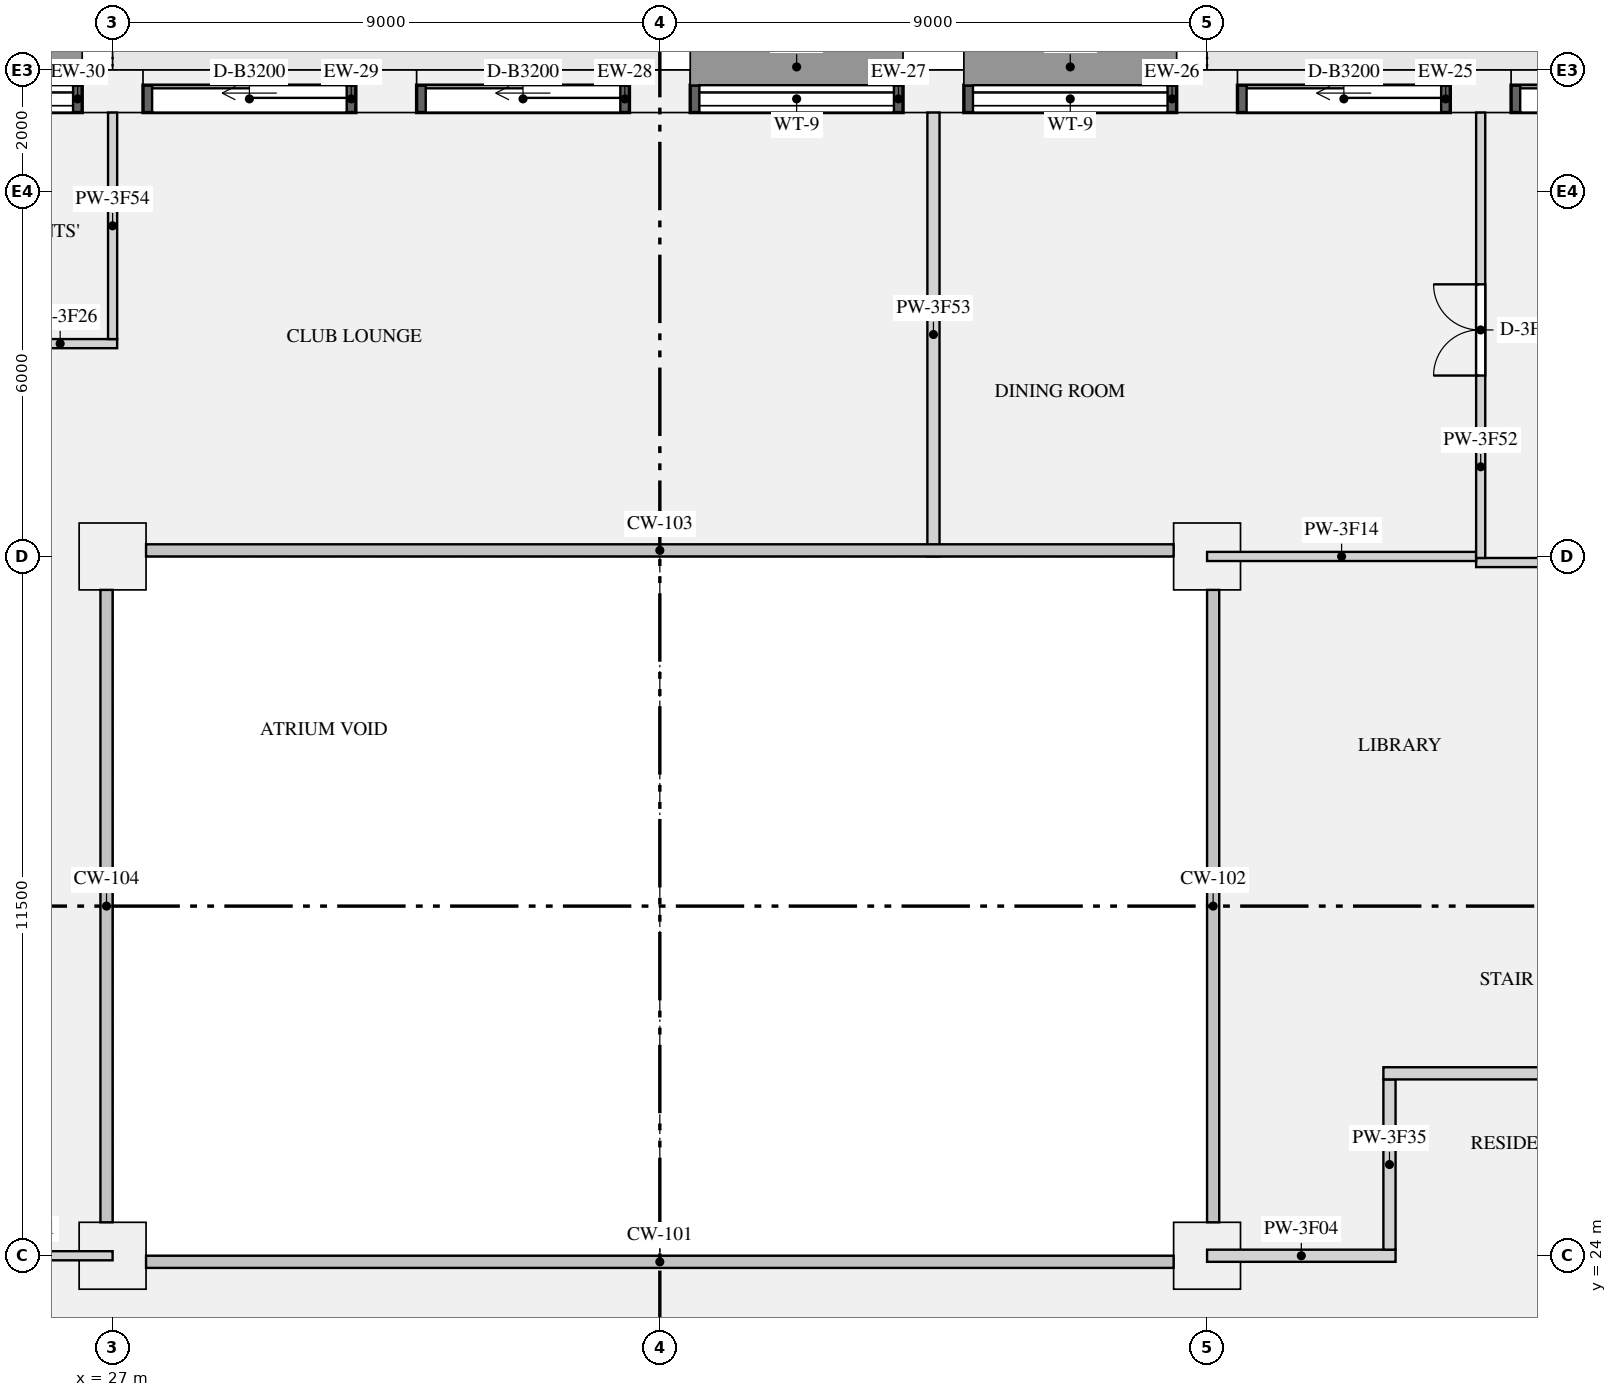
"""IFC4 building model, lengths in metres.
Left out: names, types, materials, properties, quantities, classifications, styles, units other than length and angle.
Written with IfcOpenShell. Run it as: python <this file> out.ifc"""

import sys

from ifc_helpers import new_model, si_unit, direction, frame, frame_2d, origin, origin_2d, place, context, subcontext, project, spatial, rectangle, extrude, element, fill, save


model = new_model("IFC4")
c1 = context("Model", 3, precision=1e-05, world=origin(), true_north=direction((0.0, 1.0)))
c2 = subcontext(c1, "Body", "Model", "MODEL_VIEW")
j1 = project(units=[si_unit("LENGTHUNIT", "METRE"), si_unit("PLANEANGLEUNIT", "RADIAN")], contexts=[c1])
p1 = place(None, origin())
s1 = spatial("IfcSite", under=j1, at=p1, CompositionType="ELEMENT")
p2 = place(p1, origin())
s2 = spatial("IfcBuilding", under=s1, at=p2, CompositionType="ELEMENT")
p3 = place(p2, frame((0.0, 0.0, 182.25)))
s3 = spatial("IfcBuildingStorey", under=s2, at=p3, CompositionType="ELEMENT", Elevation=182.25)
for number, where, z_axis, x_axis in (
    (1, (49.5, 43.15, 0.0), (0.0, 0.0, 1.0), (-1.0, 0.0, 0.0)),
    (2, (45.0, 43.15, 0.0), (0.0, 0.0, 1.0), (-1.0, 0.0, 0.0)),
    (3, (40.5, 43.15, 0.0), (0.0, 0.0, 1.0), (-1.0, 0.0, 0.0)),
    (4, (36.0, 43.15, 0.0), (0.0, 0.0, 1.0), (-1.0, 0.0, 0.0)),
    (5, (31.5, 43.15, 0.0), (0.0, 0.0, 1.0), (-1.0, 0.0, 0.0)),
    (6, (27.0, 43.15, 0.0), (0.0, 0.0, 1.0), (-1.0, 0.0, 0.0)),
):
    element("IfcColumn", number, at=place(p3, frame(where, z_axis=z_axis, x_axis=x_axis)), inside=s3, PredefinedType="USERDEFINED", context=c2, shape_type="SweptSolid", body=[
        extrude(rectangle(XDim=1.0, YDim=0.7, at=origin_2d()), origin(), (0.0, 0.0, 1.0), 2.65),
    ])
for number, where, z_axis, x_axis in (
    (7, (27.0, 24.0, 0.0), (0.0, 0.0, 1.0), (1.0, 0.0, 0.0)),
    (8, (45.0, 24.0, 0.0), (0.0, 0.0, 1.0), (1.0, 0.0, 0.0)),
    (9, (27.0, 35.5, 0.0), (0.0, 0.0, 1.0), (1.0, 0.0, 0.0)),
    (10, (45.0, 35.5, 0.0), (0.0, 0.0, 1.0), (1.0, 0.0, 0.0)),
):
    element("IfcColumn", number, at=place(p3, frame(where, z_axis=z_axis, x_axis=x_axis)), inside=s3, PredefinedType="COLUMN", context=c2, shape_type="SweptSolid", body=[
        extrude(rectangle(XDim=1.1, YDim=1.1, at=origin_2d()), origin(), (0.0, 0.0, 1.0), 3.15),
    ])
p4 = place(p3, frame((53.5, 43.025, 0.0), z_axis=(0.0, 0.0, 1.0), x_axis=(-1.0, 0.0, 0.0)))
e11 = element("IfcWall", 11, at=p4, inside=s3, PredefinedType="SOLIDWALL", context=c2, shape_type="SweptSolid", body=[
    extrude(rectangle(XDim=3.5, YDim=0.45, at=frame_2d((1.75, 0.0))), origin(), (0.0, 0.0, 1.0), 2.65),
])
p5 = place(p4, frame((0.15, 0.0, 0.0)))
e12 = element("IfcOpeningElement", 12, at=p5, cuts=e11, PredefinedType="OPENING", context=c2, shape_type="SweptSolid", body=[
    extrude(rectangle(XDim=3.2, YDim=2.3, at=frame_2d((1.6, 1.15))), frame((0.0, 0.235, 0.0), z_axis=(0.0, -1.0, 0.0), x_axis=(1.0, 0.0, 0.0)), (0.0, 0.0, 1.0), 0.47),
])
p6 = place(p3, frame((49.0, 43.025, 0.0), z_axis=(0.0, 0.0, 1.0), x_axis=(-1.0, 0.0, 0.0)))
e13 = element("IfcWall", 13, at=p6, inside=s3, PredefinedType="SOLIDWALL", context=c2, shape_type="SweptSolid", body=[
    extrude(rectangle(XDim=3.5, YDim=0.45, at=frame_2d((1.75, 0.0))), origin(), (0.0, 0.0, 1.0), 2.65),
])
p7 = place(p6, frame((0.15, 0.0, 0.0)))
e14 = element("IfcOpeningElement", 14, at=p7, cuts=e13, PredefinedType="OPENING", context=c2, shape_type="SweptSolid", body=[
    extrude(rectangle(XDim=3.2, YDim=2.3, at=frame_2d((1.6, 1.15))), frame((0.0, 0.235, 0.0), z_axis=(0.0, -1.0, 0.0), x_axis=(1.0, 0.0, 0.0)), (0.0, 0.0, 1.0), 0.47),
])
p8 = place(p3, frame((44.5, 43.025, 0.9), z_axis=(0.0, 0.0, 1.0), x_axis=(-1.0, 0.0, 0.0)))
e15 = element("IfcWall", 15, at=p8, inside=s3, PredefinedType="SOLIDWALL", context=c2, shape_type="SweptSolid", body=[
    extrude(rectangle(XDim=3.5, YDim=0.45, at=frame_2d((1.75, 0.0))), origin(), (0.0, 0.0, 1.0), 1.75),
])
p9 = place(p8, frame((0.15, 0.0, 0.15)))
e16 = element("IfcOpeningElement", 16, at=p9, cuts=e15, PredefinedType="OPENING", context=c2, shape_type="SweptSolid", body=[
    extrude(rectangle(XDim=3.2, YDim=1.5, at=frame_2d((1.6, 0.75))), frame((0.0, 0.235, 0.0), z_axis=(0.0, -1.0, 0.0), x_axis=(1.0, 0.0, 0.0)), (0.0, 0.0, 1.0), 0.47),
])
p10 = place(p3, frame((40.0, 43.025, 0.9), z_axis=(0.0, 0.0, 1.0), x_axis=(-1.0, 0.0, 0.0)))
e17 = element("IfcWall", 17, at=p10, inside=s3, PredefinedType="SOLIDWALL", context=c2, shape_type="SweptSolid", body=[
    extrude(rectangle(XDim=3.5, YDim=0.45, at=frame_2d((1.75, 0.0))), origin(), (0.0, 0.0, 1.0), 1.75),
])
p11 = place(p10, frame((0.15, 0.0, 0.15)))
e18 = element("IfcOpeningElement", 18, at=p11, cuts=e17, PredefinedType="OPENING", context=c2, shape_type="SweptSolid", body=[
    extrude(rectangle(XDim=3.2, YDim=1.5, at=frame_2d((1.6, 0.75))), frame((0.0, 0.235, 0.0), z_axis=(0.0, -1.0, 0.0), x_axis=(1.0, 0.0, 0.0)), (0.0, 0.0, 1.0), 0.47),
])
p12 = place(p3, frame((35.5, 43.025, 0.0), z_axis=(0.0, 0.0, 1.0), x_axis=(-1.0, 0.0, 0.0)))
e19 = element("IfcWall", 19, at=p12, inside=s3, PredefinedType="SOLIDWALL", context=c2, shape_type="SweptSolid", body=[
    extrude(rectangle(XDim=3.5, YDim=0.45, at=frame_2d((1.75, 0.0))), origin(), (0.0, 0.0, 1.0), 2.65),
])
p13 = place(p12, frame((0.15, 0.0, 0.0)))
e20 = element("IfcOpeningElement", 20, at=p13, cuts=e19, PredefinedType="OPENING", context=c2, shape_type="SweptSolid", body=[
    extrude(rectangle(XDim=3.2, YDim=2.3, at=frame_2d((1.6, 1.15))), frame((0.0, 0.235, 0.0), z_axis=(0.0, -1.0, 0.0), x_axis=(1.0, 0.0, 0.0)), (0.0, 0.0, 1.0), 0.47),
])
p14 = place(p3, frame((31.0, 43.025, 0.0), z_axis=(0.0, 0.0, 1.0), x_axis=(-1.0, 0.0, 0.0)))
e21 = element("IfcWall", 21, at=p14, inside=s3, PredefinedType="SOLIDWALL", context=c2, shape_type="SweptSolid", body=[
    extrude(rectangle(XDim=3.5, YDim=0.45, at=frame_2d((1.75, 0.0))), origin(), (0.0, 0.0, 1.0), 2.65),
])
p15 = place(p14, frame((0.15, 0.0, 0.0)))
e22 = element("IfcOpeningElement", 22, at=p15, cuts=e21, PredefinedType="OPENING", context=c2, shape_type="SweptSolid", body=[
    extrude(rectangle(XDim=3.2, YDim=2.3, at=frame_2d((1.6, 1.15))), frame((0.0, 0.235, 0.0), z_axis=(0.0, -1.0, 0.0), x_axis=(1.0, 0.0, 0.0)), (0.0, 0.0, 1.0), 0.47),
])
p16 = place(p3, frame((26.5, 43.025, 0.9), z_axis=(0.0, 0.0, 1.0), x_axis=(-1.0, 0.0, 0.0)))
e23 = element("IfcWall", 23, at=p16, inside=s3, PredefinedType="SOLIDWALL", context=c2, shape_type="SweptSolid", body=[
    extrude(rectangle(XDim=3.5, YDim=0.45, at=frame_2d((1.75, 0.0))), origin(), (0.0, 0.0, 1.0), 1.75),
])
p17 = place(p16, frame((0.15, 0.0, 0.15)))
e24 = element("IfcOpeningElement", 24, at=p17, cuts=e23, PredefinedType="OPENING", context=c2, shape_type="SweptSolid", body=[
    extrude(rectangle(XDim=3.2, YDim=1.5, at=frame_2d((1.6, 0.75))), frame((0.0, 0.235, 0.0), z_axis=(0.0, -1.0, 0.0), x_axis=(1.0, 0.0, 0.0)), (0.0, 0.0, 1.0), 0.47),
])
p18 = place(p3, frame((23.925, 24.0, 0.0), z_axis=(0.0, 0.0, 1.0), x_axis=(1.0, 0.0, 0.0)))
e25 = element("IfcWall", 25, at=p18, inside=s3, PredefinedType="PARTITIONING", context=c2, shape_type="SweptSolid", body=[
    extrude(rectangle(XDim=3.075, YDim=0.15, at=frame_2d((1.538, 0.0))), origin(), (0.0, 0.0, 1.0), 2.65),
])
p19 = place(p3, frame((45.0, 24.0, 0.0), z_axis=(0.0, 0.0, 1.0), x_axis=(1.0, 0.0, 0.0)))
e26 = element("IfcWall", 26, at=p19, inside=s3, PredefinedType="PARTITIONING", context=c2, shape_type="SweptSolid", body=[
    extrude(rectangle(XDim=3.1, YDim=0.2, at=frame_2d((1.55, 0.0))), origin(), (0.0, 0.0, 1.0), 2.65),
])
p20 = place(p3, frame((47.9, 27.0, 0.0), z_axis=(0.0, 0.0, 1.0), x_axis=(1.0, 0.0, 0.0)))
e27 = element("IfcWall", 27, at=p20, inside=s3, PredefinedType="PARTITIONING", context=c2, shape_type="SweptSolid", body=[
    extrude(rectangle(XDim=7.0, YDim=0.2, at=frame_2d((3.5, 0.0))), origin(), (0.0, 0.0, 1.0), 2.65),
])
p21 = place(p3, frame((49.425, 35.4, 0.0), z_axis=(0.0, 0.0, 1.0), x_axis=(1.0, 0.0, 0.0)))
e28 = element("IfcWall", 28, at=p21, inside=s3, PredefinedType="PARTITIONING", context=c2, shape_type="SweptSolid", body=[
    extrude(rectangle(XDim=6.775, YDim=0.15, at=frame_2d((3.387, 0.0))), origin(), (0.0, 0.0, 1.0), 2.65),
])
p22 = place(p21, frame((1.6, 0.0, 0.0)))
e29 = element("IfcOpeningElement", 29, at=p22, cuts=e28, PredefinedType="OPENING", context=c2, shape_type="SweptSolid", body=[
    extrude(rectangle(XDim=0.9, YDim=2.1, at=frame_2d((0.45, 1.05))), frame((0.0, 0.085, 0.0), z_axis=(0.0, -1.0, 0.0), x_axis=(1.0, 0.0, 0.0)), (0.0, 0.0, 1.0), 0.17),
])
p23 = place(p3, frame((45.0, 35.5, 0.0), z_axis=(0.0, 0.0, 1.0), x_axis=(1.0, 0.0, 0.0)))
e30 = element("IfcWall", 30, at=p23, inside=s3, PredefinedType="PARTITIONING", context=c2, shape_type="SweptSolid", body=[
    extrude(rectangle(XDim=4.425, YDim=0.15, at=frame_2d((2.212, 0.0))), origin(), (0.0, 0.0, 1.0), 2.65),
])
p24 = place(p3, frame((22.6, 39.0, 0.0), z_axis=(0.0, 0.0, 1.0), x_axis=(1.0, 0.0, 0.0)))
e31 = element("IfcWall", 31, at=p24, inside=s3, PredefinedType="PARTITIONING", context=c2, shape_type="SweptSolid", body=[
    extrude(rectangle(XDim=4.475, YDim=0.15, at=frame_2d((2.237, 0.0))), origin(), (0.0, 0.0, 1.0), 2.65),
])
p25 = place(p24, frame((1.7, 0.0, 0.0)))
e32 = element("IfcOpeningElement", 32, at=p25, cuts=e31, PredefinedType="OPENING", context=c2, shape_type="SweptSolid", body=[
    extrude(rectangle(XDim=0.9, YDim=2.1, at=frame_2d((0.45, 1.05))), frame((0.0, 0.085, 0.0), z_axis=(0.0, -1.0, 0.0), x_axis=(1.0, 0.0, 0.0)), (0.0, 0.0, 1.0), 0.17),
])
p26 = place(p3, frame((48.0, 24.1, 0.0), z_axis=(0.0, 0.0, 1.0), x_axis=(0.0, 1.0, 0.0)))
e33 = element("IfcWall", 33, at=p26, inside=s3, PredefinedType="PARTITIONING", context=c2, shape_type="SweptSolid", body=[
    extrude(rectangle(XDim=2.8, YDim=0.2, at=frame_2d((1.4, 0.0))), origin(), (0.0, 0.0, 1.0), 2.65),
])
p27 = place(p3, frame((49.5, 35.475, 0.0), z_axis=(0.0, 0.0, 1.0), x_axis=(0.0, 1.0, 0.0)))
e34 = element("IfcWall", 34, at=p27, inside=s3, PredefinedType="PARTITIONING", context=c2, shape_type="SweptSolid", body=[
    extrude(rectangle(XDim=7.325, YDim=0.15, at=frame_2d((3.663, 0.0))), origin(), (0.0, 0.0, 1.0), 2.65),
])
p28 = place(p27, frame((3.0, 0.0, 0.0)))
e35 = element("IfcOpeningElement", 35, at=p28, cuts=e34, PredefinedType="OPENING", context=c2, shape_type="SweptSolid", body=[
    extrude(rectangle(XDim=1.5, YDim=2.1, at=frame_2d((0.75, 1.05))), frame((0.0, 0.085, 0.0), z_axis=(0.0, -1.0, 0.0), x_axis=(1.0, 0.0, 0.0)), (0.0, 0.0, 1.0), 0.17),
])
p29 = place(p3, frame((40.5, 35.5, 0.0), z_axis=(0.0, 0.0, 1.0), x_axis=(0.0, 1.0, 0.0)))
e36 = element("IfcWall", 36, at=p29, inside=s3, PredefinedType="PARTITIONING", context=c2, shape_type="SweptSolid", body=[
    extrude(rectangle(XDim=7.3, YDim=0.2, at=frame_2d((3.65, 0.0))), origin(), (0.0, 0.0, 1.0), 2.65),
])
p30 = place(p3, frame((27.0, 39.075, 0.0), z_axis=(0.0, 0.0, 1.0), x_axis=(0.0, 1.0, 0.0)))
e37 = element("IfcWall", 37, at=p30, inside=s3, PredefinedType="PARTITIONING", context=c2, shape_type="SweptSolid", body=[
    extrude(rectangle(XDim=3.725, YDim=0.15, at=frame_2d((1.863, 0.0))), origin(), (0.0, 0.0, 1.0), 2.65),
])
p31 = place(p5, origin())
e38 = element("IfcDoor", 38, at=p31, inside=s3, OperationType="SLIDING_TO_LEFT", PredefinedType="DOOR", context=c2, shape_type="SweptSolid", body=[
    extrude(rectangle(XDim=3.2, YDim=2.3, at=frame_2d((1.6, 1.15))), frame((0.0, -0.07, 0.0), z_axis=(0.0, -1.0, 0.0), x_axis=(1.0, 0.0, 0.0)), (0.0, 0.0, 1.0), 0.05),
])
fill(e12, e38)
p32 = place(p7, origin())
e39 = element("IfcDoor", 39, at=p32, inside=s3, OperationType="SLIDING_TO_LEFT", PredefinedType="DOOR", context=c2, shape_type="SweptSolid", body=[
    extrude(rectangle(XDim=3.2, YDim=2.3, at=frame_2d((1.6, 1.15))), frame((0.0, -0.07, 0.0), z_axis=(0.0, -1.0, 0.0), x_axis=(1.0, 0.0, 0.0)), (0.0, 0.0, 1.0), 0.05),
])
fill(e14, e39)
p33 = place(p9, origin())
e40 = element("IfcWindow", 40, at=p33, inside=s3, PartitioningType="SINGLE_PANEL", PredefinedType="WINDOW", context=c2, shape_type="SweptSolid", body=[
    extrude(rectangle(XDim=3.2, YDim=1.5, at=frame_2d((1.6, 0.75))), frame((0.0, -0.065, 0.0), z_axis=(0.0, -1.0, 0.0), x_axis=(1.0, 0.0, 0.0)), (0.0, 0.0, 1.0), 0.06),
])
fill(e16, e40)
p34 = place(p11, origin())
e41 = element("IfcWindow", 41, at=p34, inside=s3, PartitioningType="SINGLE_PANEL", PredefinedType="WINDOW", context=c2, shape_type="SweptSolid", body=[
    extrude(rectangle(XDim=3.2, YDim=1.5, at=frame_2d((1.6, 0.75))), frame((0.0, -0.065, 0.0), z_axis=(0.0, -1.0, 0.0), x_axis=(1.0, 0.0, 0.0)), (0.0, 0.0, 1.0), 0.06),
])
fill(e18, e41)
p35 = place(p13, origin())
e42 = element("IfcDoor", 42, at=p35, inside=s3, OperationType="SLIDING_TO_LEFT", PredefinedType="DOOR", context=c2, shape_type="SweptSolid", body=[
    extrude(rectangle(XDim=3.2, YDim=2.3, at=frame_2d((1.6, 1.15))), frame((0.0, -0.07, 0.0), z_axis=(0.0, -1.0, 0.0), x_axis=(1.0, 0.0, 0.0)), (0.0, 0.0, 1.0), 0.05),
])
fill(e20, e42)
p36 = place(p15, origin())
e43 = element("IfcDoor", 43, at=p36, inside=s3, OperationType="SLIDING_TO_LEFT", PredefinedType="DOOR", context=c2, shape_type="SweptSolid", body=[
    extrude(rectangle(XDim=3.2, YDim=2.3, at=frame_2d((1.6, 1.15))), frame((0.0, -0.07, 0.0), z_axis=(0.0, -1.0, 0.0), x_axis=(1.0, 0.0, 0.0)), (0.0, 0.0, 1.0), 0.05),
])
fill(e22, e43)
p37 = place(p17, origin())
e44 = element("IfcWindow", 44, at=p37, inside=s3, PartitioningType="SINGLE_PANEL", PredefinedType="WINDOW", context=c2, shape_type="SweptSolid", body=[
    extrude(rectangle(XDim=3.2, YDim=1.5, at=frame_2d((1.6, 0.75))), frame((0.0, -0.065, 0.0), z_axis=(0.0, -1.0, 0.0), x_axis=(1.0, 0.0, 0.0)), (0.0, 0.0, 1.0), 0.06),
])
fill(e24, e44)
p38 = place(p28, origin())
e45 = element("IfcDoor", 45, at=p38, inside=s3, OperationType="DOUBLE_DOOR_SINGLE_SWING", PredefinedType="DOOR", context=c2, shape_type="SweptSolid", body=[
    extrude(rectangle(XDim=1.5, YDim=2.1, at=frame_2d((0.75, 1.05))), frame((0.0, 0.025, 0.0), z_axis=(0.0, -1.0, 0.0), x_axis=(1.0, 0.0, 0.0)), (0.0, 0.0, 1.0), 0.05),
])
fill(e35, e45)
save(model, sys.argv[1])
